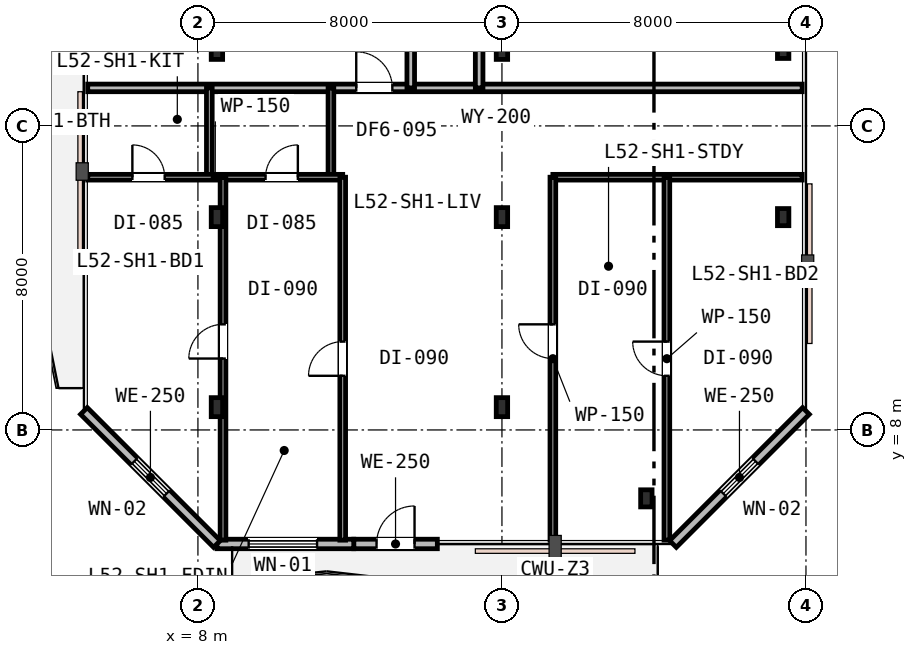
"""IFC4 building model, lengths in metres.
Left out: names, types, materials, properties, quantities, classifications, styles, units other than length and angle.
Written with IfcOpenShell. Run it as: python <this file> out.ifc"""

import sys

from ifc_helpers import new_model, si_unit, direction, frame, frame_2d, origin, origin_2d, place, context, subcontext, project, spatial, rectangle, i_section, extrude, element, fill, save


model = new_model("IFC4")
c1 = context("Model", 3, precision=1e-05, world=origin(), true_north=direction((0.0, 1.0)))
c2 = subcontext(c1, "Body", "Model", "MODEL_VIEW")
j1 = project(units=[si_unit("LENGTHUNIT", "METRE"), si_unit("PLANEANGLEUNIT", "RADIAN")], contexts=[c1])
p1 = place(None, origin())
s1 = spatial("IfcSite", under=j1, at=p1, CompositionType="ELEMENT")
p2 = place(p1, origin())
s2 = spatial("IfcBuilding", under=s1, at=p2, CompositionType="ELEMENT")
p3 = place(p2, frame((0.0, 0.0, 201.0)))
s3 = spatial("IfcBuildingStorey", under=s2, at=p3, CompositionType="ELEMENT", Elevation=201.0)
for number, where, z_axis, x_axis in (
    (1, (19.8, 6.2, 0.0), (0.0, 0.0, 1.0), (1.0, 0.0, 0.0)),
    (2, (23.4, 13.6, 0.0), (0.0, 0.0, 1.0), (1.0, 0.0, 0.0)),
    (3, (23.4, 18.0, 0.0), (0.0, 0.0, 1.0), (1.0, 0.0, 0.0)),
):
    element("IfcColumn", number, at=place(p3, frame(where, z_axis=z_axis, x_axis=x_axis)), inside=s3, PredefinedType="COLUMN", context=c2, shape_type="SweptSolid", body=[
        extrude(i_section(OverallWidth=0.3, OverallDepth=0.45, WebThickness=0.014, FlangeThickness=0.026, FilletRadius=0.027, at=origin_2d()), origin(), (0.0, 0.0, 1.0), 3.6),
    ])
for number, where, z_axis, x_axis in (
    (4, (8.5, 8.6, 0.0), (0.0, 0.0, 1.0), (1.0, 0.0, 0.0)),
    (5, (16.0, 8.6, 0.0), (0.0, 0.0, 1.0), (1.0, 0.0, 0.0)),
    (6, (8.5, 13.6, 0.0), (0.0, 0.0, 1.0), (1.0, 0.0, 0.0)),
    (7, (16.0, 13.6, 0.0), (0.0, 0.0, 1.0), (1.0, 0.0, 0.0)),
    (8, (8.5, 18.0, 0.0), (0.0, 0.0, 1.0), (1.0, 0.0, 0.0)),
    (9, (16.0, 18.0, 0.0), (0.0, 0.0, 1.0), (1.0, 0.0, 0.0)),
):
    element("IfcColumn", number, at=place(p3, frame(where, z_axis=z_axis, x_axis=x_axis)), inside=s3, PredefinedType="COLUMN", context=c2, shape_type="SweptSolid", body=[
        extrude(i_section(OverallWidth=0.3, OverallDepth=0.5, WebThickness=0.015, FlangeThickness=0.028, FilletRadius=0.027, at=origin_2d()), origin(), (0.0, 0.0, 1.0), 3.6),
    ])
p4 = place(p3, frame((12.1, 5.0, 0.0), z_axis=(0.0, 0.0, 1.0), x_axis=(1.0, 0.0, 0.0)))
e10 = element("IfcWall", 10, at=p4, inside=s3, PredefinedType="STANDARD", context=c2, shape_type="SweptSolid", body=[
    extrude(rectangle(XDim=2.2, YDim=0.25, at=frame_2d((1.1, 0.0))), origin(), (0.0, 0.0, 1.0), 3.33),
])
p5 = place(p4, frame((0.6, 0.0, 0.0)))
e11 = element("IfcOpeningElement", 11, at=p5, cuts=e10, PredefinedType="OPENING", context=c2, shape_type="SweptSolid", body=[
    extrude(rectangle(XDim=1.0, YDim=2.15, at=frame_2d((0.5, 1.075))), frame((0.0, 0.135, 0.0), z_axis=(0.0, -1.0, 0.0), x_axis=(1.0, 0.0, 0.0)), (0.0, 0.0, 1.0), 0.27),
])
p6 = place(p3, frame((8.5, 5.0, 0.0), z_axis=(0.0, 0.0, 1.0), x_axis=(1.0, 0.0, 0.0)))
e12 = element("IfcWall", 12, at=p6, inside=s3, PredefinedType="STANDARD", context=c2, shape_type="SweptSolid", body=[
    extrude(rectangle(XDim=3.6, YDim=0.25, at=frame_2d((1.8, 0.0))), origin(), (0.0, 0.0, 1.0), 3.33),
])
p7 = place(p6, frame((0.835, 0.0, 0.75)))
e13 = element("IfcOpeningElement", 13, at=p7, cuts=e12, PredefinedType="OPENING", context=c2, shape_type="SweptSolid", body=[
    extrude(rectangle(XDim=1.8, YDim=1.85, at=frame_2d((0.9, 0.925))), frame((0.0, 0.135, 0.0), z_axis=(0.0, -1.0, 0.0), x_axis=(1.0, 0.0, 0.0)), (0.0, 0.0, 1.0), 0.27),
])
p8 = place(p3, frame((20.5, 5.0, 0.0), z_axis=(0.0, 0.0, 1.0), x_axis=(0.707106781187, 0.707106781187, 0.0)))
e14 = element("IfcWall", 14, at=p8, inside=s3, PredefinedType="STANDARD", context=c2, shape_type="SweptSolid", body=[
    extrude(rectangle(XDim=4.95, YDim=0.25, at=frame_2d((2.475, 0.0))), origin(), (0.0, 0.0, 1.0), 3.33),
])
p9 = place(p8, frame((1.875, 0.0, 0.85)))
e15 = element("IfcOpeningElement", 15, at=p9, cuts=e14, PredefinedType="OPENING", context=c2, shape_type="SweptSolid", body=[
    extrude(rectangle(XDim=1.2, YDim=1.6, at=frame_2d((0.6, 0.8))), frame((0.0, 0.135, 0.0), z_axis=(0.0, -1.0, 0.0), x_axis=(1.0, 0.0, 0.0)), (0.0, 0.0, 1.0), 0.27),
])
p10 = place(p3, frame((5.0, 8.5, 0.0), z_axis=(0.0, 0.0, 1.0), x_axis=(0.707106781187, -0.707106781187, 0.0)))
e16 = element("IfcWall", 16, at=p10, inside=s3, PredefinedType="STANDARD", context=c2, shape_type="SweptSolid", body=[
    extrude(rectangle(XDim=4.95, YDim=0.25, at=frame_2d((2.475, 0.0))), origin(), (0.0, 0.0, 1.0), 3.33),
])
p11 = place(p10, frame((1.875, 0.0, 0.85)))
e17 = element("IfcOpeningElement", 17, at=p11, cuts=e16, PredefinedType="OPENING", context=c2, shape_type="SweptSolid", body=[
    extrude(rectangle(XDim=1.2, YDim=1.6, at=frame_2d((0.6, 0.8))), frame((0.0, 0.135, 0.0), z_axis=(0.0, -1.0, 0.0), x_axis=(1.0, 0.0, 0.0)), (0.0, 0.0, 1.0), 0.27),
])
p12 = place(p3, frame((5.1, 17.0, 0.0), z_axis=(0.0, 0.0, 1.0), x_axis=(1.0, 0.0, 0.0)))
e18 = element("IfcWall", 18, at=p12, inside=s3, PredefinedType="PARTITIONING", context=c2, shape_type="SweptSolid", body=[
    extrude(rectangle(XDim=18.8, YDim=0.2, at=frame_2d((9.4, 0.0))), origin(), (0.0, 0.0, 1.0), 2.72),
])
p13 = place(p12, frame((7.066, 0.0, 0.0)))
e19 = element("IfcOpeningElement", 19, at=p13, cuts=e18, PredefinedType="OPENING", context=c2, shape_type="SweptSolid", body=[
    extrude(rectangle(XDim=0.95, YDim=2.15, at=frame_2d((0.475, 1.075))), frame((0.0, 0.11, 0.0), z_axis=(0.0, -1.0, 0.0), x_axis=(1.0, 0.0, 0.0)), (0.0, 0.0, 1.0), 0.22),
])
p14 = place(p3, frame((13.6, 17.0, 0.0), z_axis=(0.0, 0.0, 1.0), x_axis=(0.0, 1.0, 0.0)))
e20 = element("IfcWall", 20, at=p14, inside=s3, PredefinedType="PARTITIONING", context=c2, shape_type="SweptSolid", body=[
    extrude(rectangle(XDim=11.6, YDim=0.2, at=frame_2d((5.8, 0.0))), origin(), (0.0, 0.0, 1.0), 2.72),
])
p15 = place(p14, frame((8.996, 0.0, 0.0)))
e21 = element("IfcOpeningElement", 21, at=p15, cuts=e20, PredefinedType="OPENING", context=c2, shape_type="SweptSolid", body=[
    extrude(rectangle(XDim=0.95, YDim=2.15, at=frame_2d((0.475, 1.075))), frame((0.0, 0.11, 0.0), z_axis=(0.0, -1.0, 0.0), x_axis=(1.0, 0.0, 0.0)), (0.0, 0.0, 1.0), 0.22),
])
p16 = place(p14, frame((2.269, 0.0, 0.0)))
e22 = element("IfcOpeningElement", 22, at=p16, cuts=e20, PredefinedType="OPENING", context=c2, shape_type="SweptSolid", body=[
    extrude(rectangle(XDim=0.95, YDim=2.15, at=frame_2d((0.475, 1.075))), frame((0.0, 0.11, 0.0), z_axis=(0.0, -1.0, 0.0), x_axis=(1.0, 0.0, 0.0)), (0.0, 0.0, 1.0), 0.22),
])
p17 = place(p3, frame((15.4, 17.0, 0.0), z_axis=(0.0, 0.0, 1.0), x_axis=(0.0, 1.0, 0.0)))
e23 = element("IfcWall", 23, at=p17, inside=s3, PredefinedType="PARTITIONING", context=c2, shape_type="SweptSolid", body=[
    extrude(rectangle(XDim=11.6, YDim=0.2, at=frame_2d((5.8, 0.0))), origin(), (0.0, 0.0, 1.0), 2.72),
])
p18 = place(p17, frame((9.095, 0.0, 0.0)))
e24 = element("IfcOpeningElement", 24, at=p18, cuts=e23, PredefinedType="OPENING", context=c2, shape_type="SweptSolid", body=[
    extrude(rectangle(XDim=0.95, YDim=2.15, at=frame_2d((0.475, 1.075))), frame((0.0, 0.11, 0.0), z_axis=(0.0, -1.0, 0.0), x_axis=(1.0, 0.0, 0.0)), (0.0, 0.0, 1.0), 0.22),
])
p19 = place(p17, frame((3.295, 0.0, 0.0)))
e25 = element("IfcOpeningElement", 25, at=p19, cuts=e23, PredefinedType="OPENING", context=c2, shape_type="SweptSolid", body=[
    extrude(rectangle(XDim=0.95, YDim=2.15, at=frame_2d((0.475, 1.075))), frame((0.0, 0.11, 0.0), z_axis=(0.0, -1.0, 0.0), x_axis=(1.0, 0.0, 0.0)), (0.0, 0.0, 1.0), 0.22),
])
p20 = place(p3, frame((11.5, 14.65, 0.0), z_axis=(0.0, 0.0, 1.0), x_axis=(0.0, 1.0, 0.0)))
e26 = element("IfcWall", 26, at=p20, inside=s3, PredefinedType="PARTITIONING", context=c2, shape_type="SweptSolid", body=[
    extrude(rectangle(XDim=2.35, YDim=0.15, at=frame_2d((1.175, 0.0))), origin(), (0.0, 0.0, 1.0), 3.02),
])
p21 = place(p3, frame((8.3, 14.65, 0.0), z_axis=(0.0, 0.0, 1.0), x_axis=(0.0, 1.0, 0.0)))
e27 = element("IfcWall", 27, at=p21, inside=s3, PredefinedType="PARTITIONING", context=c2, shape_type="SweptSolid", body=[
    extrude(rectangle(XDim=2.35, YDim=0.15, at=frame_2d((1.175, 0.0))), origin(), (0.0, 0.0, 1.0), 2.72),
])
p22 = place(p3, frame((5.1, 14.65, 0.0), z_axis=(0.0, 0.0, 1.0), x_axis=(1.0, 0.0, 0.0)))
e28 = element("IfcWall", 28, at=p22, inside=s3, PredefinedType="PARTITIONING", context=c2, shape_type="SweptSolid", body=[
    extrude(rectangle(XDim=6.71, YDim=0.15, at=frame_2d((3.355, 0.0))), origin(), (0.0, 0.0, 1.0), 2.72),
])
p23 = place(p22, frame((1.175, 0.0, 0.0)))
e29 = element("IfcOpeningElement", 29, at=p23, cuts=e28, PredefinedType="OPENING", context=c2, shape_type="SweptSolid", body=[
    extrude(rectangle(XDim=0.85, YDim=2.15, at=frame_2d((0.425, 1.075))), frame((0.0, 0.085, 0.0), z_axis=(0.0, -1.0, 0.0), x_axis=(1.0, 0.0, 0.0)), (0.0, 0.0, 1.0), 0.17),
])
p24 = place(p22, frame((4.679, 0.0, 0.0)))
e30 = element("IfcOpeningElement", 30, at=p24, cuts=e28, PredefinedType="OPENING", context=c2, shape_type="SweptSolid", body=[
    extrude(rectangle(XDim=0.85, YDim=2.15, at=frame_2d((0.425, 1.075))), frame((0.0, 0.085, 0.0), z_axis=(0.0, -1.0, 0.0), x_axis=(1.0, 0.0, 0.0)), (0.0, 0.0, 1.0), 0.17),
])
p25 = place(p3, frame((17.34, 14.65, 0.0), z_axis=(0.0, 0.0, 1.0), x_axis=(1.0, 0.0, 0.0)))
e31 = element("IfcWall", 31, at=p25, inside=s3, PredefinedType="PARTITIONING", context=c2, shape_type="SweptSolid", body=[
    extrude(rectangle(XDim=6.56, YDim=0.15, at=frame_2d((3.28, 0.0))), origin(), (0.0, 0.0, 1.0), 3.02),
])
p26 = place(p3, frame((8.66, 5.1, 0.0), z_axis=(0.0, 0.0, 1.0), x_axis=(0.0, 1.0, 0.0)))
e32 = element("IfcWall", 32, at=p26, inside=s3, PredefinedType="PARTITIONING", context=c2, shape_type="SweptSolid", body=[
    extrude(rectangle(XDim=9.55, YDim=0.15, at=frame_2d((4.775, 0.0))), origin(), (0.0, 0.0, 1.0), 2.72),
])
p27 = place(p26, frame((4.779, 0.0, 0.0)))
e33 = element("IfcOpeningElement", 33, at=p27, cuts=e32, PredefinedType="OPENING", context=c2, shape_type="SweptSolid", body=[
    extrude(rectangle(XDim=0.9, YDim=2.15, at=frame_2d((0.45, 1.075))), frame((0.0, 0.085, 0.0), z_axis=(0.0, -1.0, 0.0), x_axis=(1.0, 0.0, 0.0)), (0.0, 0.0, 1.0), 0.17),
])
p28 = place(p3, frame((20.34, 5.1, 0.0), z_axis=(0.0, 0.0, 1.0), x_axis=(0.0, 1.0, 0.0)))
e34 = element("IfcWall", 34, at=p28, inside=s3, PredefinedType="PARTITIONING", context=c2, shape_type="SweptSolid", body=[
    extrude(rectangle(XDim=9.55, YDim=0.15, at=frame_2d((4.775, 0.0))), origin(), (0.0, 0.0, 1.0), 2.72),
])
p29 = place(p28, frame((4.325, 0.0, 0.0)))
e35 = element("IfcOpeningElement", 35, at=p29, cuts=e34, PredefinedType="OPENING", context=c2, shape_type="SweptSolid", body=[
    extrude(rectangle(XDim=0.9, YDim=2.15, at=frame_2d((0.45, 1.075))), frame((0.0, 0.085, 0.0), z_axis=(0.0, -1.0, 0.0), x_axis=(1.0, 0.0, 0.0)), (0.0, 0.0, 1.0), 0.17),
])
p30 = place(p3, frame((17.34, 5.1, 0.0), z_axis=(0.0, 0.0, 1.0), x_axis=(0.0, 1.0, 0.0)))
e36 = element("IfcWall", 36, at=p30, inside=s3, PredefinedType="PARTITIONING", context=c2, shape_type="SweptSolid", body=[
    extrude(rectangle(XDim=9.55, YDim=0.15, at=frame_2d((4.775, 0.0))), origin(), (0.0, 0.0, 1.0), 2.72),
])
p31 = place(p30, frame((4.779, 0.0, 0.0)))
e37 = element("IfcOpeningElement", 37, at=p31, cuts=e36, PredefinedType="OPENING", context=c2, shape_type="SweptSolid", body=[
    extrude(rectangle(XDim=0.9, YDim=2.15, at=frame_2d((0.45, 1.075))), frame((0.0, 0.085, 0.0), z_axis=(0.0, -1.0, 0.0), x_axis=(1.0, 0.0, 0.0)), (0.0, 0.0, 1.0), 0.17),
])
p32 = place(p3, frame((11.81, 5.1, 0.0), z_axis=(0.0, 0.0, 1.0), x_axis=(0.0, 1.0, 0.0)))
e38 = element("IfcWall", 38, at=p32, inside=s3, PredefinedType="PARTITIONING", context=c2, shape_type="SweptSolid", body=[
    extrude(rectangle(XDim=9.55, YDim=0.15, at=frame_2d((4.775, 0.0))), origin(), (0.0, 0.0, 1.0), 2.72),
])
p33 = place(p32, frame((4.325, 0.0, 0.0)))
e39 = element("IfcOpeningElement", 39, at=p33, cuts=e38, PredefinedType="OPENING", context=c2, shape_type="SweptSolid", body=[
    extrude(rectangle(XDim=0.9, YDim=2.15, at=frame_2d((0.45, 1.075))), frame((0.0, 0.085, 0.0), z_axis=(0.0, -1.0, 0.0), x_axis=(1.0, 0.0, 0.0)), (0.0, 0.0, 1.0), 0.17),
])
p34 = place(p5, origin())
e40 = element("IfcDoor", 40, at=p34, inside=s3, OperationType="SINGLE_SWING_RIGHT", PredefinedType="DOOR", context=c2, shape_type="SweptSolid", body=[
    extrude(rectangle(XDim=1.0, YDim=2.15, at=frame_2d((0.5, 1.075))), frame((0.0, 0.025, 0.0), z_axis=(0.0, -1.0, 0.0), x_axis=(1.0, 0.0, 0.0)), (0.0, 0.0, 1.0), 0.05),
])
fill(e11, e40)
p35 = place(p7, origin())
e41 = element("IfcWindow", 41, at=p35, inside=s3, PartitioningType="SINGLE_PANEL", PredefinedType="WINDOW", context=c2, shape_type="SweptSolid", body=[
    extrude(rectangle(XDim=1.8, YDim=1.85, at=frame_2d((0.9, 0.925))), frame((0.0, 0.03, 0.0), z_axis=(0.0, -1.0, 0.0), x_axis=(1.0, 0.0, 0.0)), (0.0, 0.0, 1.0), 0.06),
])
fill(e13, e41)
p36 = place(p9, origin())
e42 = element("IfcWindow", 42, at=p36, inside=s3, PartitioningType="SINGLE_PANEL", PredefinedType="WINDOW", context=c2, shape_type="SweptSolid", body=[
    extrude(rectangle(XDim=1.2, YDim=1.6, at=frame_2d((0.6, 0.8))), frame((0.0, 0.03, 0.0), z_axis=(0.0, -1.0, 0.0), x_axis=(1.0, 0.0, 0.0)), (0.0, 0.0, 1.0), 0.06),
])
fill(e15, e42)
p37 = place(p11, origin())
e43 = element("IfcWindow", 43, at=p37, inside=s3, PartitioningType="SINGLE_PANEL", PredefinedType="WINDOW", context=c2, shape_type="SweptSolid", body=[
    extrude(rectangle(XDim=1.2, YDim=1.6, at=frame_2d((0.6, 0.8))), frame((0.0, 0.03, 0.0), z_axis=(0.0, -1.0, 0.0), x_axis=(1.0, 0.0, 0.0)), (0.0, 0.0, 1.0), 0.06),
])
fill(e17, e43)
p38 = place(p13, origin())
e44 = element("IfcDoor", 44, at=p38, inside=s3, OperationType="SINGLE_SWING_LEFT", PredefinedType="DOOR", context=c2, shape_type="SweptSolid", body=[
    extrude(rectangle(XDim=0.95, YDim=2.15, at=frame_2d((0.475, 1.075))), frame((0.0, 0.025, 0.0), z_axis=(0.0, -1.0, 0.0), x_axis=(1.0, 0.0, 0.0)), (0.0, 0.0, 1.0), 0.05),
])
fill(e19, e44)
p39 = place(p23, origin())
e45 = element("IfcDoor", 45, at=p39, inside=s3, OperationType="SINGLE_SWING_LEFT", PredefinedType="DOOR", context=c2, shape_type="SweptSolid", body=[
    extrude(rectangle(XDim=0.85, YDim=2.15, at=frame_2d((0.425, 1.075))), frame((0.0, 0.025, 0.0), z_axis=(0.0, -1.0, 0.0), x_axis=(1.0, 0.0, 0.0)), (0.0, 0.0, 1.0), 0.05),
])
fill(e29, e45)
p40 = place(p24, origin())
e46 = element("IfcDoor", 46, at=p40, inside=s3, OperationType="SINGLE_SWING_RIGHT", PredefinedType="DOOR", context=c2, shape_type="SweptSolid", body=[
    extrude(rectangle(XDim=0.85, YDim=2.15, at=frame_2d((0.425, 1.075))), frame((0.0, 0.025, 0.0), z_axis=(0.0, -1.0, 0.0), x_axis=(1.0, 0.0, 0.0)), (0.0, 0.0, 1.0), 0.05),
])
fill(e30, e46)
p41 = place(p27, origin())
e47 = element("IfcDoor", 47, at=p41, inside=s3, OperationType="SINGLE_SWING_LEFT", PredefinedType="DOOR", context=c2, shape_type="SweptSolid", body=[
    extrude(rectangle(XDim=0.9, YDim=2.15, at=frame_2d((0.45, 1.075))), frame((0.0, 0.025, 0.0), z_axis=(0.0, -1.0, 0.0), x_axis=(1.0, 0.0, 0.0)), (0.0, 0.0, 1.0), 0.05),
])
fill(e33, e47)
p42 = place(p29, origin())
e48 = element("IfcDoor", 48, at=p42, inside=s3, OperationType="SINGLE_SWING_RIGHT", PredefinedType="DOOR", context=c2, shape_type="SweptSolid", body=[
    extrude(rectangle(XDim=0.9, YDim=2.15, at=frame_2d((0.45, 1.075))), frame((0.0, 0.025, 0.0), z_axis=(0.0, -1.0, 0.0), x_axis=(1.0, 0.0, 0.0)), (0.0, 0.0, 1.0), 0.05),
])
fill(e35, e48)
p43 = place(p31, origin())
e49 = element("IfcDoor", 49, at=p43, inside=s3, OperationType="SINGLE_SWING_RIGHT", PredefinedType="DOOR", context=c2, shape_type="SweptSolid", body=[
    extrude(rectangle(XDim=0.9, YDim=2.15, at=frame_2d((0.45, 1.075))), frame((0.0, 0.025, 0.0), z_axis=(0.0, -1.0, 0.0), x_axis=(1.0, 0.0, 0.0)), (0.0, 0.0, 1.0), 0.05),
])
fill(e37, e49)
p44 = place(p33, origin())
e50 = element("IfcDoor", 50, at=p44, inside=s3, OperationType="SINGLE_SWING_LEFT", PredefinedType="DOOR", context=c2, shape_type="SweptSolid", body=[
    extrude(rectangle(XDim=0.9, YDim=2.15, at=frame_2d((0.45, 1.075))), frame((0.0, 0.025, 0.0), z_axis=(0.0, -1.0, 0.0), x_axis=(1.0, 0.0, 0.0)), (0.0, 0.0, 1.0), 0.05),
])
fill(e39, e50)
save(model, sys.argv[1])
